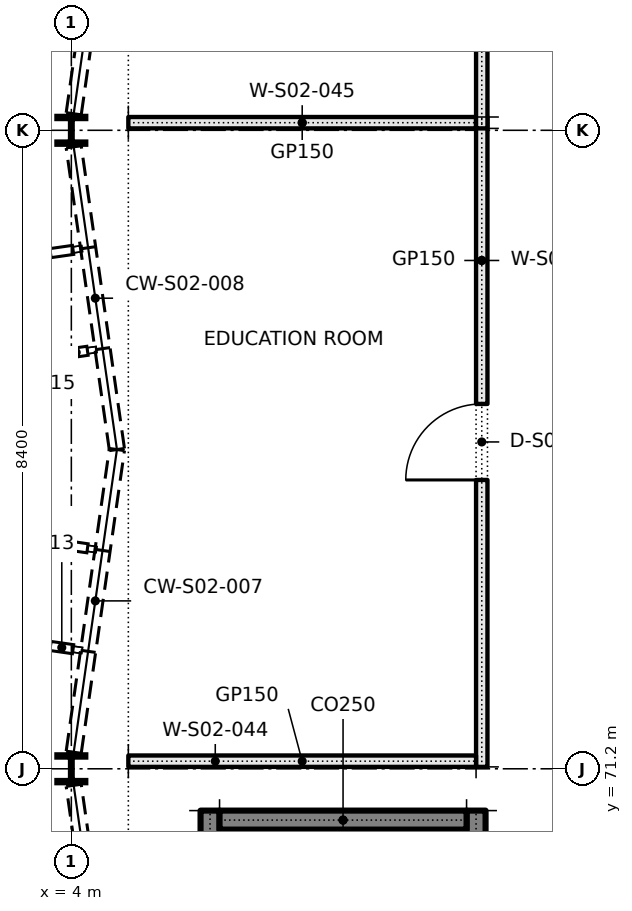
"""IFC4 building model, lengths in metres.
Left out: names, types, materials, properties, quantities, classifications, styles, units other than length and angle.
Written with IfcOpenShell. Run it as: python <this file> out.ifc"""

import sys

from ifc_helpers import new_model, si_unit, direction, frame, frame_2d, origin, origin_2d, place, context, subcontext, project, spatial, rectangle, i_section, extrude, element, fill, save


model = new_model("IFC4")
c1 = context("Model", 3, precision=1e-05, world=origin(), true_north=direction((0.0, 1.0)))
c2 = subcontext(c1, "Body", "Model", "MODEL_VIEW")
j1 = project(units=[si_unit("LENGTHUNIT", "METRE"), si_unit("PLANEANGLEUNIT", "RADIAN")], contexts=[c1])
p1 = place(None, origin())
s1 = spatial("IfcSite", under=j1, at=p1, CompositionType="ELEMENT")
p2 = place(p1, origin())
s2 = spatial("IfcBuilding", under=s1, at=p2, CompositionType="ELEMENT")
p3 = place(p2, frame((0.0, 0.0, 10.2)))
s3 = spatial("IfcBuildingStorey", under=s2, at=p3, CompositionType="ELEMENT", Elevation=10.2)
for number, where, z_axis, x_axis in (
    (1, (4.0, 71.2, 0.0), (0.0, 0.0, 1.0), (1.0, 0.0, 0.0)),
    (2, (4.0, 79.6, 0.0), (0.0, 0.0, 1.0), (1.0, 0.0, 0.0)),
):
    element("IfcColumn", number, at=place(p3, frame(where, z_axis=z_axis, x_axis=x_axis)), inside=s3, PredefinedType="COLUMN", context=c2, shape_type="SweptSolid", body=[
        extrude(i_section(OverallWidth=0.368, OverallDepth=0.356, WebThickness=0.011, FlangeThickness=0.018, FilletRadius=0.015, at=origin_2d()), origin(), (0.0, 0.0, 1.0), 4.8),
    ])
p4 = place(p3, frame((5.825, 62.95, 0.0), z_axis=(0.0, 0.0, 1.0), x_axis=(0.0, 1.0, 0.0)))
e3 = element("IfcWall", 3, at=p4, inside=s3, PredefinedType="SHEAR", context=c2, shape_type="SweptSolid", body=[
    extrude(rectangle(XDim=7.7, YDim=0.25, at=frame_2d((3.85, 0.0))), origin(), (0.0, 0.0, 1.0), 4.8),
])
p5 = place(p3, frame((9.325, 62.95, 0.0), z_axis=(0.0, 0.0, 1.0), x_axis=(0.0, 1.0, 0.0)))
e4 = element("IfcWall", 4, at=p5, inside=s3, PredefinedType="SHEAR", context=c2, shape_type="SweptSolid", body=[
    extrude(rectangle(XDim=7.7, YDim=0.25, at=frame_2d((3.85, 0.0))), origin(), (0.0, 0.0, 1.0), 4.8),
])
p6 = place(p5, frame((0.4, 0.0, 0.0)))
e5 = element("IfcOpeningElement", 5, at=p6, cuts=e4, PredefinedType="OPENING", context=c2, shape_type="SweptSolid", body=[
    extrude(rectangle(XDim=1.1, YDim=2.1, at=frame_2d((0.55, 1.05))), frame((0.0, 0.135, 0.0), z_axis=(0.0, -1.0, 0.0), x_axis=(1.0, 0.0, 0.0)), (0.0, 0.0, 1.0), 0.27),
])
p7 = place(p3, frame((5.95, 70.525, 0.0), z_axis=(0.0, 0.0, 1.0), x_axis=(1.0, 0.0, 0.0)))
e6 = element("IfcWall", 6, at=p7, inside=s3, PredefinedType="SHEAR", context=c2, shape_type="SweptSolid", body=[
    extrude(rectangle(XDim=3.25, YDim=0.25, at=frame_2d((1.625, 0.0))), origin(), (0.0, 0.0, 1.0), 4.8),
])
p8 = place(p3, frame((9.4, 71.225, 0.0), z_axis=(0.0, 0.0, 1.0), x_axis=(0.0, 1.0, 0.0)))
e7 = element("IfcWall", 7, at=p8, inside=s3, PredefinedType="PARTITIONING", context=c2, shape_type="SweptSolid", body=[
    extrude(rectangle(XDim=8.55, YDim=0.15, at=frame_2d((4.275, 0.0))), origin(), (0.0, 0.0, 1.0), 4.8),
])
p9 = place(p8, frame((3.775, 0.0, 0.0)))
e8 = element("IfcOpeningElement", 8, at=p9, cuts=e7, PredefinedType="OPENING", context=c2, shape_type="SweptSolid", body=[
    extrude(rectangle(XDim=1.0, YDim=2.1, at=frame_2d((0.5, 1.05))), frame((0.0, 0.085, 0.0), z_axis=(0.0, -1.0, 0.0), x_axis=(1.0, 0.0, 0.0)), (0.0, 0.0, 1.0), 0.17),
])
for number, where, z_axis, x_axis in (
    (9, (4.75, 71.3, 0.0), (0.0, 0.0, 1.0), (1.0, 0.0, 0.0)),
    (10, (4.75, 79.7, 0.0), (0.0, 0.0, 1.0), (1.0, 0.0, 0.0)),
):
    element("IfcWall", number, at=place(p3, frame(where, z_axis=z_axis, x_axis=x_axis)), inside=s3, PredefinedType="PARTITIONING", context=c2, shape_type="SweptSolid", body=[
        extrude(rectangle(XDim=4.575, YDim=0.15, at=frame_2d((2.288, 0.0))), origin(), (0.0, 0.0, 1.0), 4.8),
    ])
p10 = place(p3, frame((9.4, 79.625, 0.0), z_axis=(0.0, 0.0, 1.0), x_axis=(0.0, 1.0, 0.0)))
e11 = element("IfcWall", 11, at=p10, inside=s3, PredefinedType="PARTITIONING", context=c2, shape_type="SweptSolid", body=[
    extrude(rectangle(XDim=8.45, YDim=0.15, at=frame_2d((4.225, 0.0))), origin(), (0.0, 0.0, 1.0), 4.8),
])
p11 = place(p10, frame((3.725, 0.0, 0.0)))
e12 = element("IfcOpeningElement", 12, at=p11, cuts=e11, PredefinedType="OPENING", context=c2, shape_type="SweptSolid", body=[
    extrude(rectangle(XDim=1.0, YDim=2.1, at=frame_2d((0.5, 1.05))), frame((0.0, 0.085, 0.0), z_axis=(0.0, -1.0, 0.0), x_axis=(1.0, 0.0, 0.0)), (0.0, 0.0, 1.0), 0.17),
])
p12 = place(p9, origin())
e13 = element("IfcDoor", 13, at=p12, inside=s3, OperationType="SINGLE_SWING_LEFT", PredefinedType="DOOR", context=c2, shape_type="SweptSolid", body=[
    extrude(rectangle(XDim=1.0, YDim=2.1, at=frame_2d((0.5, 1.05))), frame((0.0, 0.025, 0.0), z_axis=(0.0, -1.0, 0.0), x_axis=(1.0, 0.0, 0.0)), (0.0, 0.0, 1.0), 0.05),
])
fill(e8, e13)
save(model, sys.argv[1])
